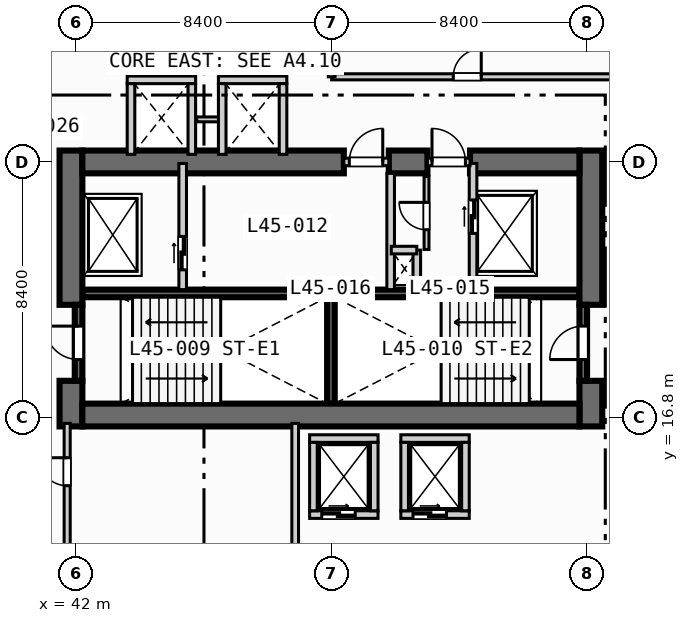
"""IFC4 building model, lengths in metres.
Left out: names, types, materials, properties, quantities, classifications, styles, units other than length and angle.
Written with IfcOpenShell. Run it as: python <this file> out.ifc"""

import sys

from ifc_helpers import new_model, si_unit, direction, frame, frame_2d, origin, place, context, subcontext, project, spatial, rectangle, extrude, element, fill, save


model = new_model("IFC4")
c1 = context("Model", 3, precision=1e-05, world=origin(), true_north=direction((0.0, 1.0)))
c2 = subcontext(c1, "Body", "Model", "MODEL_VIEW")
j1 = project(units=[si_unit("LENGTHUNIT", "METRE"), si_unit("PLANEANGLEUNIT", "RADIAN")], contexts=[c1])
p1 = place(None, origin())
s1 = spatial("IfcSite", under=j1, at=p1, CompositionType="ELEMENT")
p2 = place(p1, origin())
s2 = spatial("IfcBuilding", under=s1, at=p2, CompositionType="ELEMENT")
p3 = place(p2, frame((0.0, 0.0, 186.5)))
s3 = spatial("IfcBuildingStorey", under=s2, at=p3, CompositionType="ELEMENT", Elevation=186.5)
for number, where, z_axis, x_axis in (
    (1, (42.2, 20.875, 0.0), (0.0, 0.0, 1.0), (1.0, 0.0, 0.0)),
    (2, (50.5, 20.875, 0.0), (0.0, 0.0, 1.0), (1.0, 0.0, 0.0)),
):
    element("IfcWall", number, at=place(p3, frame(where, z_axis=z_axis, x_axis=x_axis)), inside=s3, PredefinedType="SOLIDWALL", context=c2, shape_type="SweptSolid", body=[
        extrude(rectangle(XDim=8.05, YDim=0.25, at=frame_2d((4.025, 0.0))), origin(), (0.0, 0.0, 1.0), 3.47),
    ])
p4 = place(p3, frame((50.375, 17.25, 0.0), z_axis=(0.0, 0.0, 1.0), x_axis=(0.0, 1.0, 0.0)))
e3 = element("IfcWall", 3, at=p4, inside=s3, PredefinedType="SOLIDWALL", context=c2, shape_type="SweptSolid", body=[
    extrude(rectangle(XDim=3.5, YDim=0.25, at=frame_2d((1.75, 0.0))), origin(), (0.0, 0.0, 1.0), 3.47),
])
p5 = place(p3, frame((41.825, 16.5, 0.0), z_axis=(0.0, 0.0, 1.0), x_axis=(0.0, 1.0, 0.0)))
e4 = element("IfcWall", 4, at=p5, inside=s3, PredefinedType="SHEAR", context=c2, shape_type="SweptSolid", body=[
    extrude(rectangle(XDim=1.5, YDim=0.75, at=frame_2d((0.75, 0.0))), origin(), (0.0, 0.0, 1.0), 3.47),
])
p6 = place(p3, frame((41.825, 20.5, 0.0), z_axis=(0.0, 0.0, 1.0), x_axis=(0.0, 1.0, 0.0)))
e5 = element("IfcWall", 5, at=p6, inside=s3, PredefinedType="SHEAR", context=c2, shape_type="SweptSolid", body=[
    extrude(rectangle(XDim=5.075, YDim=0.75, at=frame_2d((2.538, 0.0))), origin(), (0.0, 0.0, 1.0), 3.47),
])
p7 = place(p3, frame((58.925, 16.5, 0.0), z_axis=(0.0, 0.0, 1.0), x_axis=(0.0, 1.0, 0.0)))
e6 = element("IfcWall", 6, at=p7, inside=s3, PredefinedType="SHEAR", context=c2, shape_type="SweptSolid", body=[
    extrude(rectangle(XDim=1.5, YDim=0.75, at=frame_2d((0.75, 0.0))), origin(), (0.0, 0.0, 1.0), 3.47),
])
p8 = place(p3, frame((58.925, 20.5, 0.0), z_axis=(0.0, 0.0, 1.0), x_axis=(0.0, 1.0, 0.0)))
e7 = element("IfcWall", 7, at=p8, inside=s3, PredefinedType="SHEAR", context=c2, shape_type="SweptSolid", body=[
    extrude(rectangle(XDim=5.075, YDim=0.75, at=frame_2d((2.538, 0.0))), origin(), (0.0, 0.0, 1.0), 3.47),
])
p9 = place(p3, frame((42.2, 16.875, 0.0), z_axis=(0.0, 0.0, 1.0), x_axis=(1.0, 0.0, 0.0)))
e8 = element("IfcWall", 8, at=p9, inside=s3, PredefinedType="SHEAR", context=c2, shape_type="SweptSolid", body=[
    extrude(rectangle(XDim=16.35, YDim=0.75, at=frame_2d((8.175, 0.0))), origin(), (0.0, 0.0, 1.0), 3.47),
])
p10 = place(p3, frame((42.2, 25.2, 0.0), z_axis=(0.0, 0.0, 1.0), x_axis=(1.0, 0.0, 0.0)))
e9 = element("IfcWall", 9, at=p10, inside=s3, PredefinedType="SHEAR", context=c2, shape_type="SweptSolid", body=[
    extrude(rectangle(XDim=8.6, YDim=0.75, at=frame_2d((4.3, 0.0))), origin(), (0.0, 0.0, 1.0), 3.47),
])
p11 = place(p3, frame((52.28, 25.2, 0.0), z_axis=(0.0, 0.0, 1.0), x_axis=(1.0, 0.0, 0.0)))
e10 = element("IfcWall", 10, at=p11, inside=s3, PredefinedType="SHEAR", context=c2, shape_type="SweptSolid", body=[
    extrude(rectangle(XDim=1.27, YDim=0.75, at=frame_2d((0.635, 0.0))), origin(), (0.0, 0.0, 1.0), 3.47),
])
p12 = place(p3, frame((54.95, 25.2, 0.0), z_axis=(0.0, 0.0, 1.0), x_axis=(1.0, 0.0, 0.0)))
e11 = element("IfcWall", 11, at=p12, inside=s3, PredefinedType="SHEAR", context=c2, shape_type="SweptSolid", body=[
    extrude(rectangle(XDim=3.6, YDim=0.75, at=frame_2d((1.8, 0.0))), origin(), (0.0, 0.0, 1.0), 3.47),
])
p13 = place(p3, frame((42.075, 18.0, 0.0), z_axis=(0.0, 0.0, 1.0), x_axis=(0.0, 1.0, 0.0)))
e12 = element("IfcWall", 12, at=p13, inside=s3, PredefinedType="SOLIDWALL", context=c2, shape_type="SweptSolid", body=[
    extrude(rectangle(XDim=2.5, YDim=0.25, at=frame_2d((1.25, 0.0))), origin(), (0.0, 0.0, 1.0), 3.47),
])
p14 = place(p13, frame((0.7, 0.0, 0.0)))
e13 = element("IfcOpeningElement", 13, at=p14, cuts=e12, PredefinedType="OPENING", context=c2, shape_type="SweptSolid", body=[
    extrude(rectangle(XDim=1.1, YDim=2.15, at=frame_2d((0.55, 1.075))), frame((0.0, 0.135, 0.0), z_axis=(0.0, -1.0, 0.0), x_axis=(1.0, 0.0, 0.0)), (0.0, 0.0, 1.0), 0.27),
])
p15 = place(p3, frame((58.675, 18.0, 0.0), z_axis=(0.0, 0.0, 1.0), x_axis=(0.0, 1.0, 0.0)))
e14 = element("IfcWall", 14, at=p15, inside=s3, PredefinedType="SOLIDWALL", context=c2, shape_type="SweptSolid", body=[
    extrude(rectangle(XDim=2.5, YDim=0.25, at=frame_2d((1.25, 0.0))), origin(), (0.0, 0.0, 1.0), 3.47),
])
p16 = place(p15, frame((0.7, 0.0, 0.0)))
e15 = element("IfcOpeningElement", 15, at=p16, cuts=e14, PredefinedType="OPENING", context=c2, shape_type="SweptSolid", body=[
    extrude(rectangle(XDim=1.1, YDim=2.15, at=frame_2d((0.55, 1.075))), frame((0.0, 0.135, 0.0), z_axis=(0.0, -1.0, 0.0), x_axis=(1.0, 0.0, 0.0)), (0.0, 0.0, 1.0), 0.27),
])
p17 = place(p3, frame((45.5, 21.0, 0.0), z_axis=(0.0, 0.0, 1.0), x_axis=(0.0, 1.0, 0.0)))
e16 = element("IfcWall", 16, at=p17, inside=s3, PredefinedType="SOLIDWALL", context=c2, shape_type="SweptSolid", body=[
    extrude(rectangle(XDim=4.15, YDim=0.25, at=frame_2d((2.075, 0.0))), origin(), (0.0, 0.0, 1.0), 3.47),
])
p18 = place(p17, frame((0.65, 0.0, 0.0)))
e17 = element("IfcOpeningElement", 17, at=p18, cuts=e16, PredefinedType="OPENING", context=c2, shape_type="SweptSolid", body=[
    extrude(rectangle(XDim=1.1, YDim=2.15, at=frame_2d((0.55, 1.075))), frame((0.0, 0.135, 0.0), z_axis=(0.0, -1.0, 0.0), x_axis=(1.0, 0.0, 0.0)), (0.0, 0.0, 1.0), 0.27),
])
p19 = place(p3, frame((50.8, 25.2, 0.0), z_axis=(0.0, 0.0, 1.0), x_axis=(1.0, 0.0, 0.0)))
e18 = element("IfcWall", 18, at=p19, inside=s3, PredefinedType="SOLIDWALL", context=c2, shape_type="SweptSolid", body=[
    extrude(rectangle(XDim=1.48, YDim=0.25, at=frame_2d((0.74, 0.0))), origin(), (0.0, 0.0, 1.0), 3.47),
])
p20 = place(p19, frame((0.18, 0.0, 0.0)))
e19 = element("IfcOpeningElement", 19, at=p20, cuts=e18, PredefinedType="OPENING", context=c2, shape_type="SweptSolid", body=[
    extrude(rectangle(XDim=1.1, YDim=2.15, at=frame_2d((0.55, 1.075))), frame((0.0, 0.135, 0.0), z_axis=(0.0, -1.0, 0.0), x_axis=(1.0, 0.0, 0.0)), (0.0, 0.0, 1.0), 0.27),
])
p21 = place(p3, frame((52.34, 21.0, 0.0), z_axis=(0.0, 0.0, 1.0), x_axis=(0.0, 1.0, 0.0)))
e20 = element("IfcWall", 20, at=p21, inside=s3, PredefinedType="SOLIDWALL", context=c2, shape_type="SweptSolid", body=[
    extrude(rectangle(XDim=3.825, YDim=0.25, at=frame_2d((1.913, 0.0))), origin(), (0.0, 0.0, 1.0), 3.47),
])
p22 = place(p3, frame((55.05, 21.0, 0.0), z_axis=(0.0, 0.0, 1.0), x_axis=(0.0, 1.0, 0.0)))
e21 = element("IfcWall", 21, at=p22, inside=s3, PredefinedType="SOLIDWALL", context=c2, shape_type="SweptSolid", body=[
    extrude(rectangle(XDim=4.15, YDim=0.25, at=frame_2d((2.075, 0.0))), origin(), (0.0, 0.0, 1.0), 3.47),
])
p23 = place(p22, frame((1.85, 0.0, 0.0)))
e22 = element("IfcOpeningElement", 22, at=p23, cuts=e21, PredefinedType="OPENING", context=c2, shape_type="SweptSolid", body=[
    extrude(rectangle(XDim=1.1, YDim=2.15, at=frame_2d((0.55, 1.075))), frame((0.0, 0.135, 0.0), z_axis=(0.0, -1.0, 0.0), x_axis=(1.0, 0.0, 0.0)), (0.0, 0.0, 1.0), 0.27),
])
p24 = place(p3, frame((53.55, 25.2, 0.0), z_axis=(0.0, 0.0, 1.0), x_axis=(1.0, 0.0, 0.0)))
e23 = element("IfcWall", 23, at=p24, inside=s3, PredefinedType="SOLIDWALL", context=c2, shape_type="SweptSolid", body=[
    extrude(rectangle(XDim=1.4, YDim=0.25, at=frame_2d((0.7, 0.0))), origin(), (0.0, 0.0, 1.0), 3.47),
])
p25 = place(p24, frame((0.15, 0.0, 0.0)))
e24 = element("IfcOpeningElement", 24, at=p25, cuts=e23, PredefinedType="OPENING", context=c2, shape_type="SweptSolid", body=[
    extrude(rectangle(XDim=1.1, YDim=2.15, at=frame_2d((0.55, 1.075))), frame((0.0, 0.135, 0.0), z_axis=(0.0, -1.0, 0.0), x_axis=(1.0, 0.0, 0.0)), (0.0, 0.0, 1.0), 0.27),
])
p26 = place(p3, frame((53.2, 21.0, 0.0), z_axis=(0.0, 0.0, 1.0), x_axis=(0.0, 1.0, 0.0)))
e25 = element("IfcWall", 25, at=p26, inside=s3, PredefinedType="SOLIDWALL", context=c2, shape_type="SweptSolid", body=[
    extrude(rectangle(XDim=1.3, YDim=0.25, at=frame_2d((0.65, 0.0))), origin(), (0.0, 0.0, 1.0), 3.47),
])
p27 = place(p3, frame((52.36, 22.3, 0.0), z_axis=(0.0, 0.0, 1.0), x_axis=(1.0, 0.0, 0.0)))
e26 = element("IfcWall", 26, at=p27, inside=s3, PredefinedType="SOLIDWALL", context=c2, shape_type="SweptSolid", body=[
    extrude(rectangle(XDim=0.84, YDim=0.25, at=frame_2d((0.42, 0.0))), origin(), (0.0, 0.0, 1.0), 3.47),
])
p28 = place(p3, frame((53.52, 22.32, 0.0), z_axis=(0.0, 0.0, 1.0), x_axis=(0.0, 1.0, 0.0)))
e27 = element("IfcWall", 27, at=p28, inside=s3, PredefinedType="PARTITIONING", context=c2, shape_type="SweptSolid", body=[
    extrude(rectangle(XDim=2.4, YDim=0.16, at=frame_2d((1.2, 0.0))), origin(), (0.0, 0.0, 1.0), 3.47),
])
p29 = place(p28, frame((0.65, 0.0, 0.0)))
e28 = element("IfcOpeningElement", 28, at=p29, cuts=e27, PredefinedType="OPENING", context=c2, shape_type="SweptSolid", body=[
    extrude(rectangle(XDim=0.9, YDim=2.1, at=frame_2d((0.45, 1.05))), frame((0.0, 0.09, 0.0), z_axis=(0.0, -1.0, 0.0), x_axis=(1.0, 0.0, 0.0)), (0.0, 0.0, 1.0), 0.18),
])
p30 = place(p3, frame((49.675, 13.6, 0.0), z_axis=(0.0, 0.0, 1.0), x_axis=(1.0, 0.0, 0.0)))
e29 = element("IfcWall", 29, at=p30, inside=s3, PredefinedType="SOLIDWALL", context=c2, shape_type="SweptSolid", body=[
    extrude(rectangle(XDim=2.25, YDim=0.25, at=frame_2d((1.125, 0.0))), origin(), (0.0, 0.0, 1.0), 3.47),
])
p31 = place(p30, frame((0.4, 0.0, 0.0)))
e30 = element("IfcOpeningElement", 30, at=p31, cuts=e29, PredefinedType="OPENING", context=c2, shape_type="SweptSolid", body=[
    extrude(rectangle(XDim=1.1, YDim=2.15, at=frame_2d((0.55, 1.075))), frame((0.0, 0.135, 0.0), z_axis=(0.0, -1.0, 0.0), x_axis=(1.0, 0.0, 0.0)), (0.0, 0.0, 1.0), 0.27),
])
for number, where, z_axis, x_axis in (
    (31, (49.675, 16.1, 0.0), (0.0, 0.0, 1.0), (1.0, 0.0, 0.0)),
    (32, (49.8, 13.725, 0.0), (0.0, 0.0, 1.0), (0.0, 1.0, 0.0)),
    (33, (51.8, 13.725, 0.0), (0.0, 0.0, 1.0), (0.0, 1.0, 0.0)),
):
    element("IfcWall", number, at=place(p3, frame(where, z_axis=z_axis, x_axis=x_axis)), inside=s3, PredefinedType="SOLIDWALL", context=c2, shape_type="SweptSolid", body=[
        extrude(rectangle(XDim=2.25, YDim=0.25, at=frame_2d((1.125, 0.0))), origin(), (0.0, 0.0, 1.0), 3.47),
    ])
p32 = place(p3, frame((52.675, 13.6, 0.0), z_axis=(0.0, 0.0, 1.0), x_axis=(1.0, 0.0, 0.0)))
e34 = element("IfcWall", 34, at=p32, inside=s3, PredefinedType="SOLIDWALL", context=c2, shape_type="SweptSolid", body=[
    extrude(rectangle(XDim=2.25, YDim=0.25, at=frame_2d((1.125, 0.0))), origin(), (0.0, 0.0, 1.0), 3.47),
])
p33 = place(p32, frame((0.4, 0.0, 0.0)))
e35 = element("IfcOpeningElement", 35, at=p33, cuts=e34, PredefinedType="OPENING", context=c2, shape_type="SweptSolid", body=[
    extrude(rectangle(XDim=1.1, YDim=2.15, at=frame_2d((0.55, 1.075))), frame((0.0, 0.135, 0.0), z_axis=(0.0, -1.0, 0.0), x_axis=(1.0, 0.0, 0.0)), (0.0, 0.0, 1.0), 0.27),
])
for number, where, z_axis, x_axis in (
    (36, (52.675, 16.1, 0.0), (0.0, 0.0, 1.0), (1.0, 0.0, 0.0)),
    (37, (52.8, 13.725, 0.0), (0.0, 0.0, 1.0), (0.0, 1.0, 0.0)),
    (38, (54.8, 13.725, 0.0), (0.0, 0.0, 1.0), (0.0, 1.0, 0.0)),
    (39, (43.675, 27.9, 0.0), (0.0, 0.0, 1.0), (1.0, 0.0, 0.0)),
):
    element("IfcWall", number, at=place(p3, frame(where, z_axis=z_axis, x_axis=x_axis)), inside=s3, PredefinedType="SOLIDWALL", context=c2, shape_type="SweptSolid", body=[
        extrude(rectangle(XDim=2.25, YDim=0.25, at=frame_2d((1.125, 0.0))), origin(), (0.0, 0.0, 1.0), 3.47),
    ])
for number, where, z_axis, x_axis in (
    (40, (43.8, 25.45, 0.0), (0.0, 0.0, 1.0), (0.0, 1.0, 0.0)),
    (41, (45.8, 25.45, 0.0), (0.0, 0.0, 1.0), (0.0, 1.0, 0.0)),
):
    element("IfcWall", number, at=place(p3, frame(where, z_axis=z_axis, x_axis=x_axis)), inside=s3, PredefinedType="SOLIDWALL", context=c2, shape_type="SweptSolid", body=[
        extrude(rectangle(XDim=2.325, YDim=0.25, at=frame_2d((1.163, 0.0))), origin(), (0.0, 0.0, 1.0), 3.47),
    ])
p34 = place(p3, frame((45.96, 26.6, 0.0), z_axis=(0.0, 0.0, 1.0), x_axis=(1.0, 0.0, 0.0)))
e42 = element("IfcWall", 42, at=p34, inside=s3, PredefinedType="PARTITIONING", context=c2, shape_type="SweptSolid", body=[
    extrude(rectangle(XDim=0.88, YDim=0.16, at=frame_2d((0.44, 0.0))), origin(), (0.0, 0.0, 1.0), 3.47),
])
p35 = place(p3, frame((46.675, 27.9, 0.0), z_axis=(0.0, 0.0, 1.0), x_axis=(1.0, 0.0, 0.0)))
e43 = element("IfcWall", 43, at=p35, inside=s3, PredefinedType="SOLIDWALL", context=c2, shape_type="SweptSolid", body=[
    extrude(rectangle(XDim=2.25, YDim=0.25, at=frame_2d((1.125, 0.0))), origin(), (0.0, 0.0, 1.0), 3.47),
])
for number, where, z_axis, x_axis in (
    (44, (46.8, 25.45, 0.0), (0.0, 0.0, 1.0), (0.0, 1.0, 0.0)),
    (45, (48.8, 25.45, 0.0), (0.0, 0.0, 1.0), (0.0, 1.0, 0.0)),
):
    element("IfcWall", number, at=place(p3, frame(where, z_axis=z_axis, x_axis=x_axis)), inside=s3, PredefinedType="SOLIDWALL", context=c2, shape_type="SweptSolid", body=[
        extrude(rectangle(XDim=2.325, YDim=0.25, at=frame_2d((1.163, 0.0))), origin(), (0.0, 0.0, 1.0), 3.47),
    ])
p36 = place(p3, frame((41.7, 0.35, 0.0), z_axis=(0.0, 0.0, 1.0), x_axis=(0.0, 1.0, 0.0)))
e46 = element("IfcWall", 46, at=p36, inside=s3, PredefinedType="PARTITIONING", context=c2, shape_type="SweptSolid", body=[
    extrude(rectangle(XDim=16.25, YDim=0.2, at=frame_2d((8.125, 0.0))), origin(), (0.0, 0.0, 1.0), 2.82),
])
p37 = place(p36, frame((14.2, 0.0, 0.0)))
e47 = element("IfcOpeningElement", 47, at=p37, cuts=e46, PredefinedType="OPENING", context=c2, shape_type="SweptSolid", body=[
    extrude(rectangle(XDim=0.92, YDim=2.1, at=frame_2d((0.46, 1.05))), frame((0.0, 0.11, 0.0), z_axis=(0.0, -1.0, 0.0), x_axis=(1.0, 0.0, 0.0)), (0.0, 0.0, 1.0), 0.22),
])
p38 = place(p3, frame((49.2, 0.35, 0.0), z_axis=(0.0, 0.0, 1.0), x_axis=(0.0, 1.0, 0.0)))
e48 = element("IfcWall", 48, at=p38, inside=s3, PredefinedType="PARTITIONING", context=c2, shape_type="SweptSolid", body=[
    extrude(rectangle(XDim=16.25, YDim=0.22, at=frame_2d((8.125, 0.0))), origin(), (0.0, 0.0, 1.0), 3.47),
])
p39 = place(p3, frame((50.4, 28.0, 0.0), z_axis=(0.0, 0.0, 1.0), x_axis=(1.0, 0.0, 0.0)))
e49 = element("IfcWall", 49, at=p39, inside=s3, PredefinedType="PARTITIONING", context=c2, shape_type="SweptSolid", body=[
    extrude(rectangle(XDim=21.8, YDim=0.2, at=frame_2d((10.9, 0.0))), origin(), (0.0, 0.0, 1.0), 3.47),
])
p40 = place(p39, frame((4.0, 0.0, 0.0)))
e50 = element("IfcOpeningElement", 50, at=p40, cuts=e49, PredefinedType="OPENING", context=c2, shape_type="SweptSolid", body=[
    extrude(rectangle(XDim=0.92, YDim=2.1, at=frame_2d((0.46, 1.05))), frame((0.0, 0.11, 0.0), z_axis=(0.0, -1.0, 0.0), x_axis=(1.0, 0.0, 0.0)), (0.0, 0.0, 1.0), 0.22),
])
p41 = place(p3, frame((50.4, 28.0, 0.0), z_axis=(0.0, 0.0, 1.0), x_axis=(0.0, 1.0, 0.0)))
e51 = element("IfcWall", 51, at=p41, inside=s3, PredefinedType="PARTITIONING", context=c2, shape_type="SweptSolid", body=[
    extrude(rectangle(XDim=5.3, YDim=0.22, at=frame_2d((2.65, 0.0))), origin(), (0.0, 0.0, 1.0), 3.116),
])
p42 = place(p14, origin())
e52 = element("IfcDoor", 52, at=p42, inside=s3, OperationType="SINGLE_SWING_RIGHT", PredefinedType="DOOR", context=c2, shape_type="SweptSolid", body=[
    extrude(rectangle(XDim=1.1, YDim=2.15, at=frame_2d((0.55, 1.075))), frame((0.0, 0.025, 0.0), z_axis=(0.0, -1.0, 0.0), x_axis=(1.0, 0.0, 0.0)), (0.0, 0.0, 1.0), 0.05),
])
fill(e13, e52)
p43 = place(p16, origin())
e53 = element("IfcDoor", 53, at=p43, inside=s3, OperationType="SINGLE_SWING_LEFT", PredefinedType="DOOR", context=c2, shape_type="SweptSolid", body=[
    extrude(rectangle(XDim=1.1, YDim=2.15, at=frame_2d((0.55, 1.075))), frame((0.0, 0.025, 0.0), z_axis=(0.0, -1.0, 0.0), x_axis=(1.0, 0.0, 0.0)), (0.0, 0.0, 1.0), 0.05),
])
fill(e15, e53)
p44 = place(p18, origin())
e54 = element("IfcDoor", 54, at=p44, inside=s3, OperationType="SLIDING_TO_LEFT", PredefinedType="DOOR", context=c2, shape_type="SweptSolid", body=[
    extrude(rectangle(XDim=1.1, YDim=2.15, at=frame_2d((0.55, 1.075))), frame((0.0, 0.025, 0.0), z_axis=(0.0, -1.0, 0.0), x_axis=(1.0, 0.0, 0.0)), (0.0, 0.0, 1.0), 0.05),
])
fill(e17, e54)
p45 = place(p20, origin())
e55 = element("IfcDoor", 55, at=p45, inside=s3, OperationType="SINGLE_SWING_RIGHT", PredefinedType="DOOR", context=c2, shape_type="SweptSolid", body=[
    extrude(rectangle(XDim=1.1, YDim=2.15, at=frame_2d((0.55, 1.075))), frame((0.0, 0.025, 0.0), z_axis=(0.0, -1.0, 0.0), x_axis=(1.0, 0.0, 0.0)), (0.0, 0.0, 1.0), 0.05),
])
fill(e19, e55)
p46 = place(p23, origin())
e56 = element("IfcDoor", 56, at=p46, inside=s3, OperationType="SLIDING_TO_LEFT", PredefinedType="DOOR", context=c2, shape_type="SweptSolid", body=[
    extrude(rectangle(XDim=1.1, YDim=2.15, at=frame_2d((0.55, 1.075))), frame((0.0, 0.025, 0.0), z_axis=(0.0, -1.0, 0.0), x_axis=(1.0, 0.0, 0.0)), (0.0, 0.0, 1.0), 0.05),
])
fill(e22, e56)
p47 = place(p25, origin())
e57 = element("IfcDoor", 57, at=p47, inside=s3, OperationType="SINGLE_SWING_LEFT", PredefinedType="DOOR", context=c2, shape_type="SweptSolid", body=[
    extrude(rectangle(XDim=1.1, YDim=2.15, at=frame_2d((0.55, 1.075))), frame((0.0, 0.025, 0.0), z_axis=(0.0, -1.0, 0.0), x_axis=(1.0, 0.0, 0.0)), (0.0, 0.0, 1.0), 0.05),
])
fill(e24, e57)
p48 = place(p29, origin())
e58 = element("IfcDoor", 58, at=p48, inside=s3, OperationType="SINGLE_SWING_RIGHT", PredefinedType="DOOR", context=c2, shape_type="SweptSolid", body=[
    extrude(rectangle(XDim=0.9, YDim=2.1, at=frame_2d((0.45, 1.05))), frame((0.0, 0.025, 0.0), z_axis=(0.0, -1.0, 0.0), x_axis=(1.0, 0.0, 0.0)), (0.0, 0.0, 1.0), 0.05),
])
fill(e28, e58)
p49 = place(p31, origin())
e59 = element("IfcDoor", 59, at=p49, inside=s3, OperationType="SLIDING_TO_LEFT", PredefinedType="DOOR", context=c2, shape_type="SweptSolid", body=[
    extrude(rectangle(XDim=1.1, YDim=2.15, at=frame_2d((0.55, 1.075))), frame((0.0, 0.025, 0.0), z_axis=(0.0, -1.0, 0.0), x_axis=(1.0, 0.0, 0.0)), (0.0, 0.0, 1.0), 0.05),
])
fill(e30, e59)
p50 = place(p33, origin())
e60 = element("IfcDoor", 60, at=p50, inside=s3, OperationType="SLIDING_TO_LEFT", PredefinedType="DOOR", context=c2, shape_type="SweptSolid", body=[
    extrude(rectangle(XDim=1.1, YDim=2.15, at=frame_2d((0.55, 1.075))), frame((0.0, 0.025, 0.0), z_axis=(0.0, -1.0, 0.0), x_axis=(1.0, 0.0, 0.0)), (0.0, 0.0, 1.0), 0.05),
])
fill(e35, e60)
p51 = place(p37, origin())
e61 = element("IfcDoor", 61, at=p51, inside=s3, OperationType="SINGLE_SWING_RIGHT", PredefinedType="DOOR", context=c2, shape_type="SweptSolid", body=[
    extrude(rectangle(XDim=0.92, YDim=2.1, at=frame_2d((0.46, 1.05))), frame((0.0, 0.025, 0.0), z_axis=(0.0, -1.0, 0.0), x_axis=(1.0, 0.0, 0.0)), (0.0, 0.0, 1.0), 0.05),
])
fill(e47, e61)
p52 = place(p40, origin())
e62 = element("IfcDoor", 62, at=p52, inside=s3, OperationType="SINGLE_SWING_RIGHT", PredefinedType="DOOR", context=c2, shape_type="SweptSolid", body=[
    extrude(rectangle(XDim=0.92, YDim=2.1, at=frame_2d((0.46, 1.05))), frame((0.0, 0.025, 0.0), z_axis=(0.0, -1.0, 0.0), x_axis=(1.0, 0.0, 0.0)), (0.0, 0.0, 1.0), 0.05),
])
fill(e50, e62)
save(model, sys.argv[1])
